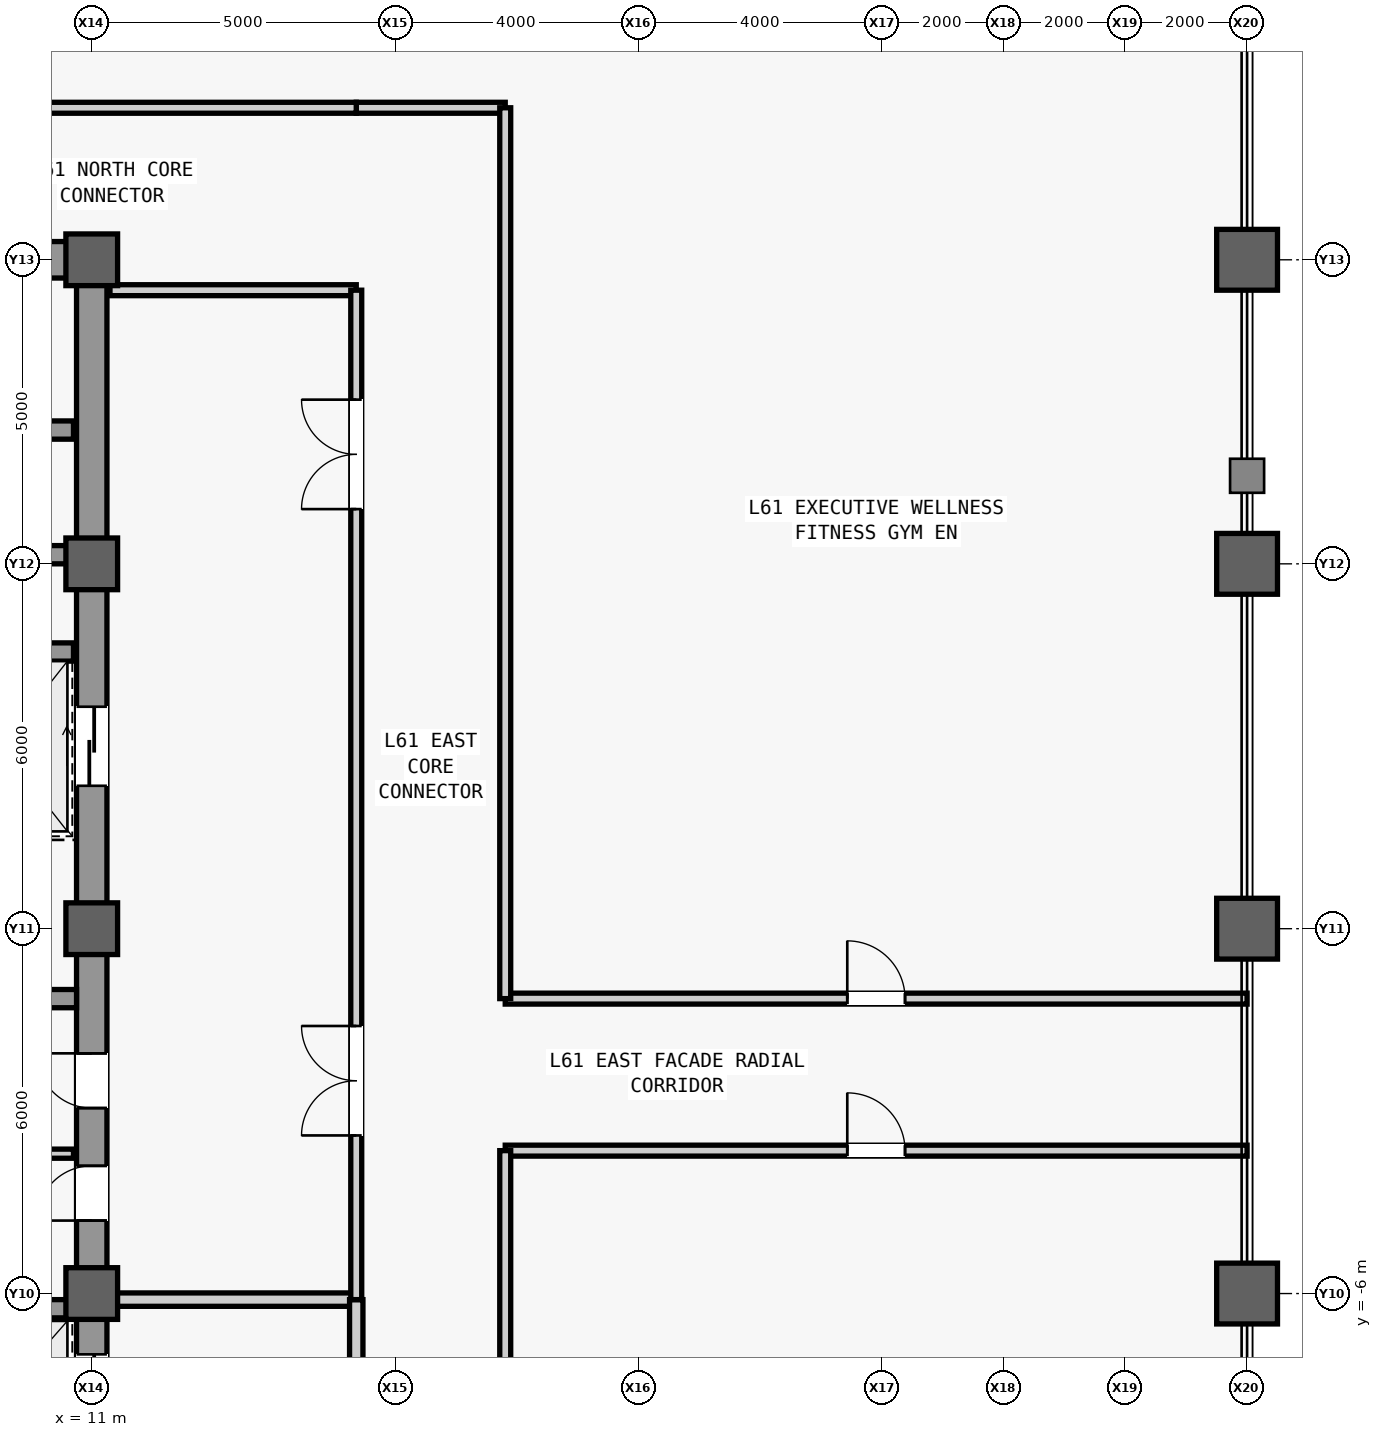
"""IFC4 building model, lengths in metres.
Left out: names, types, materials, properties, quantities, classifications, styles, units other than length and angle.
Written with IfcOpenShell. Run it as: python <this file> out.ifc"""

import sys

from ifc_helpers import new_model, si_unit, direction, frame, frame_2d, origin, origin_2d, place, context, subcontext, project, spatial, rectangle, hollow_rectangle, extrude, source, transform, mapped, element, fill, save


model = new_model("IFC4")
c1 = context("Model", 3, precision=1e-05, world=origin(), true_north=direction((0.0, 1.0)))
c2 = subcontext(c1, "Body", "Model", "MODEL_VIEW")
j1 = project(units=[si_unit("LENGTHUNIT", "METRE"), si_unit("PLANEANGLEUNIT", "RADIAN")], contexts=[c1])
p1 = place(None, origin())
s1 = spatial("IfcSite", under=j1, at=p1, CompositionType="ELEMENT")
p2 = place(p1, origin())
s2 = spatial("IfcBuilding", under=s1, at=p2, CompositionType="ELEMENT")
p3 = place(p2, frame((0.0, 0.0, 259.1)))
s3 = spatial("IfcBuildingStorey", under=s2, at=p3, CompositionType="ELEMENT", Elevation=259.1)
m1 = source(origin(), c2, "Body", "SweptSolid", [
    extrude(rectangle(XDim=22.0, YDim=0.5, at=frame_2d((11.0, 0.0))), origin(), (0.0, 0.0, 1.0), 3.78),
])
p4 = place(p3, frame((11.0, -11.0, 0.0), z_axis=(0.0, 0.0, 1.0), x_axis=(0.0, 1.0, 0.0)))
e1 = element("IfcWall", 1, at=p4, inside=s3, PredefinedType="SHEAR", context=c2, shape_type="MappedRepresentation", body=[
    mapped(m1, transform((0.0, 0.0, 0.0), scale=1.0)),
])
m2 = source(origin(), c2, "Body", "SweptSolid", [
    extrude(rectangle(XDim=1.1, YDim=2.2, at=frame_2d((0.55, 1.1))), frame((0.0, 0.26, 0.0), z_axis=(0.0, -1.0, 0.0), x_axis=(1.0, 0.0, 0.0)), (0.0, 0.0, 1.0), 0.52),
])
p5 = place(p4, frame((0.8, 0.0, 0.0)))
e2 = element("IfcOpeningElement", 2, at=p5, cuts=e1, PredefinedType="OPENING", context=c2, shape_type="MappedRepresentation", body=[
    mapped(m2, transform((0.0, 0.0, 0.0), scale=1.0)),
])
m3 = source(origin(), c2, "Body", "SweptSolid", [
    extrude(rectangle(XDim=0.9, YDim=2.15, at=frame_2d((0.45, 1.075))), frame((0.0, 0.26, 0.0), z_axis=(0.0, -1.0, 0.0), x_axis=(1.0, 0.0, 0.0)), (0.0, 0.0, 1.0), 0.52),
])
p6 = place(p4, frame((6.2, 0.0, 0.0)))
e3 = element("IfcOpeningElement", 3, at=p6, cuts=e1, PredefinedType="OPENING", context=c2, shape_type="MappedRepresentation", body=[
    mapped(m3, transform((0.0, 0.0, 0.0), scale=1.0)),
])
p7 = place(p4, frame((8.05, 0.0, 0.0)))
e4 = element("IfcOpeningElement", 4, at=p7, cuts=e1, PredefinedType="OPENING", context=c2, shape_type="MappedRepresentation", body=[
    mapped(m3, transform((0.0, 0.0, 0.0), scale=1.0)),
])
m4 = source(origin(), c2, "Body", "SweptSolid", [
    extrude(rectangle(XDim=1.3, YDim=2.3, at=frame_2d((0.65, 1.15))), frame((0.0, 0.26, 0.0), z_axis=(0.0, -1.0, 0.0), x_axis=(1.0, 0.0, 0.0)), (0.0, 0.0, 1.0), 0.52),
])
p8 = place(p4, frame((2.7, 0.0, 0.0)))
e5 = element("IfcOpeningElement", 5, at=p8, cuts=e1, PredefinedType="OPENING", context=c2, shape_type="MappedRepresentation", body=[
    mapped(m4, transform((0.0, 0.0, 0.0), scale=1.0)),
])
p9 = place(p4, frame((13.35, 0.0, 0.0)))
e6 = element("IfcOpeningElement", 6, at=p9, cuts=e1, PredefinedType="OPENING", context=c2, shape_type="MappedRepresentation", body=[
    mapped(m4, transform((0.0, 0.0, 0.0), scale=1.0)),
])
m5 = source(origin(), c2, "Body", "SweptSolid", [
    extrude(rectangle(XDim=5.9, YDim=0.6, at=frame_2d((2.95, 0.0))), origin(), (0.0, 0.0, 1.0), 3.78),
])
p10 = place(p3, frame((4.85, 11.0, 0.0), z_axis=(0.0, 0.0, 1.0), x_axis=(1.0, 0.0, 0.0)))
e7 = element("IfcWall", 7, at=p10, inside=s3, PredefinedType="SHEAR", context=c2, shape_type="MappedRepresentation", body=[
    mapped(m5, transform((0.0, 0.0, 0.0), scale=1.0)),
])
m6 = source(origin(), c2, "Body", "SweptSolid", [
    extrude(rectangle(XDim=1.05, YDim=2.2, at=frame_2d((0.525, 1.1))), frame((0.0, 0.31, 0.0), z_axis=(0.0, -1.0, 0.0), x_axis=(1.0, 0.0, 0.0)), (0.0, 0.0, 1.0), 0.62),
])
p11 = place(p10, frame((1.375, 0.0, 0.0)))
e8 = element("IfcOpeningElement", 8, at=p11, cuts=e7, PredefinedType="OPENING", context=c2, shape_type="MappedRepresentation", body=[
    mapped(m6, transform((0.0, 0.0, 0.0), scale=1.0)),
])
m7 = source(origin(), c2, "Body", "SweptSolid", [
    extrude(rectangle(XDim=5.65, YDim=0.3, at=frame_2d((2.825, 0.0))), origin(), (0.0, 0.0, 1.0), 3.78),
])
p12 = place(p3, frame((5.1, -1.15, 0.0), z_axis=(0.0, 0.0, 1.0), x_axis=(1.0, 0.0, 0.0)))
e9 = element("IfcWall", 9, at=p12, inside=s3, PredefinedType="SHEAR", context=c2, shape_type="MappedRepresentation", body=[
    mapped(m7, transform((0.0, 0.0, 0.0), scale=1.0)),
])
m8 = source(origin(), c2, "Body", "SweptSolid", [
    extrude(rectangle(XDim=0.85, YDim=0.85, at=origin_2d()), origin(), (0.0, 0.0, 1.0), 4.0),
])
for number, where, z_axis, x_axis in (
    (10, (11.0, -6.0, 0.0), (0.0, 0.0, 1.0), (1.0, 0.0, 0.0)),
    (11, (11.0, 0.0, 0.0), (0.0, 0.0, 1.0), (1.0, 0.0, 0.0)),
    (12, (11.0, 6.0, 0.0), (0.0, 0.0, 1.0), (1.0, 0.0, 0.0)),
    (13, (11.0, 11.0, 0.0), (0.0, 0.0, 1.0), (1.0, 0.0, 0.0)),
):
    element("IfcColumn", number, at=place(p3, frame(where, z_axis=z_axis, x_axis=x_axis)), inside=s3, PredefinedType="COLUMN", context=c2, shape_type="MappedRepresentation", body=[
        mapped(m8, transform((0.0, 0.0, 0.0), scale=1.0)),
    ])
m9 = source(origin(), c2, "Body", "SweptSolid", [
    extrude(hollow_rectangle(XDim=1.0, YDim=1.0, WallThickness=0.055, at=origin_2d()), origin(), (0.0, 0.0, 1.0), 4.0),
])
for number, where, z_axis, x_axis in (
    (14, (30.0, -6.0, 0.0), (0.0, 0.0, 1.0), (1.0, 0.0, 0.0)),
    (15, (30.0, 0.0, 0.0), (0.0, 0.0, 1.0), (1.0, 0.0, 0.0)),
    (16, (30.0, 6.0, 0.0), (0.0, 0.0, 1.0), (1.0, 0.0, 0.0)),
    (17, (30.0, 11.0, 0.0), (0.0, 0.0, 1.0), (1.0, 0.0, 0.0)),
):
    element("IfcColumn", number, at=place(p3, frame(where, z_axis=z_axis, x_axis=x_axis)), inside=s3, PredefinedType="COLUMN", context=c2, shape_type="MappedRepresentation", body=[
        mapped(m9, transform((0.0, 0.0, 0.0), scale=1.0)),
    ])
m10 = source(origin(), c2, "Body", "SweptSolid", [
    extrude(rectangle(XDim=2.2, YDim=0.3, at=frame_2d((1.1, 0.0))), origin(), (0.0, 0.0, 1.0), 3.78),
])
p13 = place(p3, frame((8.5, -6.25, 0.0), z_axis=(0.0, 0.0, 1.0), x_axis=(1.0, 0.0, 0.0)))
e18 = element("IfcWall", 18, at=p13, inside=s3, PredefinedType="SHEAR", context=c2, shape_type="MappedRepresentation", body=[
    mapped(m10, transform((0.0, 0.0, 0.0), scale=1.0)),
])
m11 = source(origin(), c2, "Body", "SweptSolid", [
    extrude(rectangle(XDim=2.3, YDim=0.3, at=frame_2d((1.15, 0.0))), origin(), (0.0, 0.0, 1.0), 3.78),
])
for number, where, z_axis, x_axis in (
    (19, (8.4, 4.55, 0.0), (0.0, 0.0, 1.0), (1.0, 0.0, 0.0)),
    (20, (8.4, 6.15, 0.0), (0.0, 0.0, 1.0), (1.0, 0.0, 0.0)),
    (21, (8.4, 8.2, 0.0), (0.0, 0.0, 1.0), (1.0, 0.0, 0.0)),
):
    element("IfcWall", number, at=place(p3, frame(where, z_axis=z_axis, x_axis=x_axis)), inside=s3, PredefinedType="SHEAR", context=c2, shape_type="MappedRepresentation", body=[
        mapped(m11, transform((0.0, 0.0, 0.0), scale=1.0)),
    ])
m12 = source(origin(), c2, "Body", "SweptSolid", [
    extrude(rectangle(XDim=2.05, YDim=0.15, at=frame_2d((1.025, 0.0))), origin(), (0.0, 0.0, 1.0), 3.78),
])
p14 = place(p3, frame((8.65, -3.7, 0.0), z_axis=(0.0, 0.0, 1.0), x_axis=(1.0, 0.0, 0.0)))
e22 = element("IfcWall", 22, at=p14, inside=s3, PredefinedType="PARTITIONING", context=c2, shape_type="MappedRepresentation", body=[
    mapped(m12, transform((0.0, 0.0, 0.0), scale=1.0)),
])
m13 = source(origin(), c2, "Body", "SweptSolid", [
    extrude(rectangle(XDim=4.05, YDim=0.22, at=frame_2d((2.025, 0.0))), origin(), (0.0, 0.0, 1.0), 3.085),
])
p15 = place(p3, frame((11.3, -6.1, 0.0), z_axis=(0.0, 0.0, 1.0), x_axis=(1.0, 0.0, 0.0)))
e23 = element("IfcWall", 23, at=p15, inside=s3, PredefinedType="PARTITIONING", context=c2, shape_type="MappedRepresentation", body=[
    mapped(m13, transform((0.0, 0.0, 0.0), scale=1.0)),
])
m14 = source(origin(), c2, "Body", "SweptSolid", [
    extrude(rectangle(XDim=4.4, YDim=0.22, at=frame_2d((2.2, 0.0))), origin(), (0.0, 0.0, 1.0), 3.78),
])
p16 = place(p3, frame((15.35, -10.5, 0.0), z_axis=(0.0, 0.0, 1.0), x_axis=(0.0, 1.0, 0.0)))
e24 = element("IfcWall", 24, at=p16, inside=s3, PredefinedType="PARTITIONING", context=c2, shape_type="MappedRepresentation", body=[
    mapped(m14, transform((0.0, 0.0, 0.0), scale=1.0)),
])
m15 = source(origin(), c2, "Body", "SweptSolid", [
    extrude(rectangle(XDim=1.2, YDim=2.2, at=frame_2d((0.6, 1.1))), frame((0.0, 0.12, 0.0), z_axis=(0.0, -1.0, 0.0), x_axis=(1.0, 0.0, 0.0)), (0.0, 0.0, 1.0), 0.24),
])
p17 = place(p16, frame((1.6, 0.0, 0.0)))
e25 = element("IfcOpeningElement", 25, at=p17, cuts=e24, PredefinedType="OPENING", context=c2, shape_type="MappedRepresentation", body=[
    mapped(m15, transform((0.0, 0.0, 0.0), scale=1.0)),
])
m16 = source(origin(), c2, "Body", "SweptSolid", [
    extrude(rectangle(XDim=4.05, YDim=0.18, at=frame_2d((2.025, 0.0))), origin(), (0.0, 0.0, 1.0), 3.78),
])
p18 = place(p3, frame((11.3, 10.5, 0.0), z_axis=(0.0, 0.0, 1.0), x_axis=(1.0, 0.0, 0.0)))
e26 = element("IfcWall", 26, at=p18, inside=s3, PredefinedType="PARTITIONING", context=c2, shape_type="MappedRepresentation", body=[
    mapped(m16, transform((0.0, 0.0, 0.0), scale=1.0)),
])
m17 = source(origin(), c2, "Body", "SweptSolid", [
    extrude(rectangle(XDim=16.6, YDim=0.18, at=frame_2d((8.3, 0.0))), origin(), (0.0, 0.0, 1.0), 3.78),
])
p19 = place(p3, frame((15.35, -6.1, 0.0), z_axis=(0.0, 0.0, 1.0), x_axis=(0.0, 1.0, 0.0)))
e27 = element("IfcWall", 27, at=p19, inside=s3, PredefinedType="PARTITIONING", context=c2, shape_type="MappedRepresentation", body=[
    mapped(m17, transform((0.0, 0.0, 0.0), scale=1.0)),
])
m18 = source(origin(), c2, "Body", "SweptSolid", [
    extrude(rectangle(XDim=1.8, YDim=2.25, at=frame_2d((0.9, 1.125))), frame((0.0, 0.1, 0.0), z_axis=(0.0, -1.0, 0.0), x_axis=(1.0, 0.0, 0.0)), (0.0, 0.0, 1.0), 0.2),
])
p20 = place(p19, frame((2.7, 0.0, 0.0)))
e28 = element("IfcOpeningElement", 28, at=p20, cuts=e27, PredefinedType="OPENING", context=c2, shape_type="MappedRepresentation", body=[
    mapped(m18, transform((0.0, 0.0, 0.0), scale=1.0)),
])
p21 = place(p19, frame((13.0, 0.0, 0.0)))
e29 = element("IfcOpeningElement", 29, at=p21, cuts=e27, PredefinedType="OPENING", context=c2, shape_type="MappedRepresentation", body=[
    mapped(m18, transform((0.0, 0.0, 0.0), scale=1.0)),
])
m19 = source(origin(), c2, "Body", "SweptSolid", [
    extrude(rectangle(XDim=2.45, YDim=0.18, at=frame_2d((1.225, 0.0))), origin(), (0.0, 0.0, 1.0), 3.78),
])
p22 = place(p3, frame((15.35, 13.5, 0.0), z_axis=(0.0, 0.0, 1.0), x_axis=(1.0, 0.0, 0.0)))
e30 = element("IfcWall", 30, at=p22, inside=s3, PredefinedType="PARTITIONING", context=c2, shape_type="MappedRepresentation", body=[
    mapped(m19, transform((0.0, 0.0, 0.0), scale=1.0)),
])
m20 = source(origin(), c2, "Body", "SweptSolid", [
    extrude(rectangle(XDim=15.05, YDim=0.18, at=frame_2d((7.525, 0.0))), origin(), (0.0, 0.0, 1.0), 3.78),
])
p23 = place(p3, frame((0.3, 13.5, 0.0), z_axis=(0.0, 0.0, 1.0), x_axis=(1.0, 0.0, 0.0)))
e31 = element("IfcWall", 31, at=p23, inside=s3, PredefinedType="PARTITIONING", context=c2, shape_type="MappedRepresentation", body=[
    mapped(m20, transform((0.0, 0.0, 0.0), scale=1.0)),
])
m21 = source(origin(), c2, "Body", "SweptSolid", [
    extrude(rectangle(XDim=12.2, YDim=0.18, at=frame_2d((6.1, 0.0))), origin(), (0.0, 0.0, 1.0), 3.78),
])
p24 = place(p3, frame((17.8, -3.65, 0.0), z_axis=(0.0, 0.0, 1.0), x_axis=(1.0, 0.0, 0.0)))
e32 = element("IfcWall", 32, at=p24, inside=s3, PredefinedType="PARTITIONING", context=c2, shape_type="MappedRepresentation", body=[
    mapped(m21, transform((0.0, 0.0, 0.0), scale=1.0)),
])
m22 = source(origin(), c2, "Body", "SweptSolid", [
    extrude(rectangle(XDim=0.95, YDim=2.15, at=frame_2d((0.475, 1.075))), frame((0.0, 0.1, 0.0), z_axis=(0.0, -1.0, 0.0), x_axis=(1.0, 0.0, 0.0)), (0.0, 0.0, 1.0), 0.2),
])
p25 = place(p24, frame((5.625, 0.0, 0.0)))
e33 = element("IfcOpeningElement", 33, at=p25, cuts=e32, PredefinedType="OPENING", context=c2, shape_type="MappedRepresentation", body=[
    mapped(m22, transform((0.0, 0.0, 0.0), scale=1.0)),
])
m23 = source(origin(), c2, "Body", "SweptSolid", [
    extrude(rectangle(XDim=10.55, YDim=0.18, at=frame_2d((5.275, 0.0))), origin(), (0.0, 0.0, 1.0), 3.78),
])
p26 = place(p3, frame((17.8, -14.2, 0.0), z_axis=(0.0, 0.0, 1.0), x_axis=(0.0, 1.0, 0.0)))
e34 = element("IfcWall", 34, at=p26, inside=s3, PredefinedType="PARTITIONING", context=c2, shape_type="MappedRepresentation", body=[
    mapped(m23, transform((0.0, 0.0, 0.0), scale=1.0)),
])
p27 = place(p3, frame((17.8, -1.15, 0.0), z_axis=(0.0, 0.0, 1.0), x_axis=(1.0, 0.0, 0.0)))
e35 = element("IfcWall", 35, at=p27, inside=s3, PredefinedType="PARTITIONING", context=c2, shape_type="MappedRepresentation", body=[
    mapped(m21, transform((0.0, 0.0, 0.0), scale=1.0)),
])
p28 = place(p27, frame((5.625, 0.0, 0.0)))
e36 = element("IfcOpeningElement", 36, at=p28, cuts=e35, PredefinedType="OPENING", context=c2, shape_type="MappedRepresentation", body=[
    mapped(m22, transform((0.0, 0.0, 0.0), scale=1.0)),
])
m24 = source(origin(), c2, "Body", "SweptSolid", [
    extrude(rectangle(XDim=14.65, YDim=0.18, at=frame_2d((7.325, 0.0))), origin(), (0.0, 0.0, 1.0), 3.78),
])
p29 = place(p3, frame((17.8, -1.15, 0.0), z_axis=(0.0, 0.0, 1.0), x_axis=(0.0, 1.0, 0.0)))
e37 = element("IfcWall", 37, at=p29, inside=s3, PredefinedType="PARTITIONING", context=c2, shape_type="MappedRepresentation", body=[
    mapped(m24, transform((0.0, 0.0, 0.0), scale=1.0)),
])
m25 = source(origin(), c2, "Body", "SweptSolid", [
    extrude(rectangle(XDim=0.9, YDim=2.15, at=frame_2d((0.45, 1.075))), frame((0.0, 0.025, 0.0), z_axis=(0.0, -1.0, 0.0), x_axis=(1.0, 0.0, 0.0)), (0.0, 0.0, 1.0), 0.05),
])
p30 = place(p6, origin())
e38 = element("IfcDoor", 38, at=p30, inside=s3, OperationType="SINGLE_SWING_LEFT", PredefinedType="DOOR", context=c2, shape_type="MappedRepresentation", body=[
    mapped(m25, transform((0.0, 0.0, 0.0), scale=1.0)),
])
fill(e3, e38)
p31 = place(p7, origin())
e39 = element("IfcDoor", 39, at=p31, inside=s3, OperationType="SINGLE_SWING_RIGHT", PredefinedType="DOOR", context=c2, shape_type="MappedRepresentation", body=[
    mapped(m25, transform((0.0, 0.0, 0.0), scale=1.0)),
])
fill(e4, e39)
m26 = source(origin(), c2, "Body", "SweptSolid", [
    extrude(rectangle(XDim=1.8, YDim=2.25, at=frame_2d((0.9, 1.125))), frame((0.0, 0.025, 0.0), z_axis=(0.0, -1.0, 0.0), x_axis=(1.0, 0.0, 0.0)), (0.0, 0.0, 1.0), 0.05),
])
p32 = place(p20, origin())
e40 = element("IfcDoor", 40, at=p32, inside=s3, OperationType="SINGLE_SWING_RIGHT", PredefinedType="DOOR", context=c2, shape_type="MappedRepresentation", body=[
    mapped(m26, transform((0.0, 0.0, 0.0), scale=1.0)),
])
fill(e28, e40)
p33 = place(p21, origin())
e41 = element("IfcDoor", 41, at=p33, inside=s3, OperationType="SINGLE_SWING_LEFT", PredefinedType="DOOR", context=c2, shape_type="MappedRepresentation", body=[
    mapped(m26, transform((0.0, 0.0, 0.0), scale=1.0)),
])
fill(e29, e41)
m27 = source(origin(), c2, "Body", "SweptSolid", [
    extrude(rectangle(XDim=0.95, YDim=2.15, at=frame_2d((0.475, 1.075))), frame((0.0, 0.025, 0.0), z_axis=(0.0, -1.0, 0.0), x_axis=(1.0, 0.0, 0.0)), (0.0, 0.0, 1.0), 0.05),
])
p34 = place(p25, origin())
e42 = element("IfcDoor", 42, at=p34, inside=s3, OperationType="SINGLE_SWING_LEFT", PredefinedType="DOOR", context=c2, shape_type="MappedRepresentation", body=[
    mapped(m27, transform((0.0, 0.0, 0.0), scale=1.0)),
])
fill(e33, e42)
p35 = place(p28, origin())
e43 = element("IfcDoor", 43, at=p35, inside=s3, OperationType="SINGLE_SWING_LEFT", PredefinedType="DOOR", context=c2, shape_type="MappedRepresentation", body=[
    mapped(m27, transform((0.0, 0.0, 0.0), scale=1.0)),
])
fill(e36, e43)
m28 = source(origin(), c2, "Body", "SweptSolid", [
    extrude(rectangle(XDim=1.3, YDim=2.3, at=frame_2d((0.65, 1.15))), frame((0.0, 0.025, 0.0), z_axis=(0.0, -1.0, 0.0), x_axis=(1.0, 0.0, 0.0)), (0.0, 0.0, 1.0), 0.05),
])
p36 = place(p8, origin())
e44 = element("IfcDoor", 44, at=p36, inside=s3, OperationType="SLIDING_TO_LEFT", PredefinedType="DOOR", context=c2, shape_type="MappedRepresentation", body=[
    mapped(m28, transform((0.0, 0.0, 0.0), scale=1.0)),
])
fill(e5, e44)
p37 = place(p9, origin())
e45 = element("IfcDoor", 45, at=p37, inside=s3, OperationType="SLIDING_TO_LEFT", PredefinedType="DOOR", context=c2, shape_type="MappedRepresentation", body=[
    mapped(m28, transform((0.0, 0.0, 0.0), scale=1.0)),
])
fill(e6, e45)
save(model, sys.argv[1])
